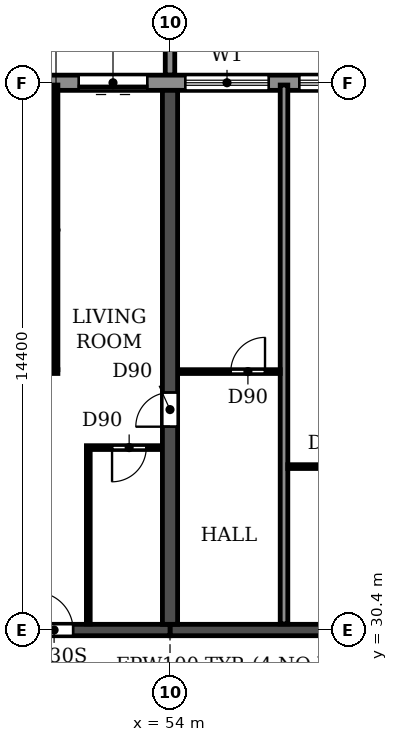
"""IFC4 building model, lengths in metres.
Left out: names, types, materials, properties, quantities, classifications, styles, units other than length and angle.
Written with IfcOpenShell. Run it as: python <this file> out.ifc"""

import sys

from ifc_helpers import new_model, si_unit, direction, frame, frame_2d, origin, place, context, subcontext, project, spatial, polyline, rectangle, outline, extrude, source, transform, mapped, element, fill, save


model = new_model("IFC4")
c1 = context("Model", 3, precision=1e-05, world=origin(), true_north=direction((0.0, 1.0)))
c2 = subcontext(c1, "Body", "Model", "MODEL_VIEW")
j1 = project(units=[si_unit("LENGTHUNIT", "METRE"), si_unit("PLANEANGLEUNIT", "RADIAN")], contexts=[c1])
p1 = place(None, origin())
s1 = spatial("IfcSite", under=j1, at=p1, CompositionType="ELEMENT")
p2 = place(p1, origin())
s2 = spatial("IfcBuilding", under=s1, at=p2, CompositionType="ELEMENT")
p3 = place(p2, frame((0.0, 0.0, 33.3)))
s3 = spatial("IfcBuildingStorey", under=s2, at=p3, CompositionType="ELEMENT", Elevation=33.3)
p4 = place(p3, frame((54.0, 30.55, 0.0), z_axis=(0.0, 0.0, 1.0), x_axis=(0.0, 1.0, 0.0)))
e1 = element("IfcWall", 1, at=p4, inside=s3, PredefinedType="SHEAR", context=c2, shape_type="SweptSolid", body=[
    extrude(rectangle(XDim=14.05, YDim=0.4, at=frame_2d((7.025, 0.0))), origin(), (0.0, 0.0, 1.0), 3.05),
])
p5 = place(p4, frame((5.2, 0.0, 0.0)))
e2 = element("IfcOpeningElement", 2, at=p5, cuts=e1, PredefinedType="OPENING", context=c2, shape_type="SweptSolid", body=[
    extrude(rectangle(XDim=0.9, YDim=2.1, at=frame_2d((0.45, 1.05))), frame((0.0, 0.21, 0.0), z_axis=(0.0, -1.0, 0.0), x_axis=(1.0, 0.0, 0.0)), (0.0, 0.0, 1.0), 0.42),
])
p6 = place(p3, frame((48.0, 30.4, 0.0), z_axis=(0.0, 0.0, 1.0), x_axis=(1.0, 0.0, 0.0)))
e3 = element("IfcWall", 3, at=p6, inside=s3, PredefinedType="SHEAR", context=c2, shape_type="SweptSolid", body=[
    extrude(rectangle(XDim=6.0, YDim=0.3, at=frame_2d((3.0, 0.0))), origin(), (0.0, 0.0, 1.0), 2.45),
])
p7 = place(p6, frame((2.45, 0.0, 0.0)))
e4 = element("IfcOpeningElement", 4, at=p7, cuts=e3, PredefinedType="OPENING", context=c2, shape_type="SweptSolid", body=[
    extrude(rectangle(XDim=1.0, YDim=2.1, at=frame_2d((0.5, 1.05))), frame((0.0, 0.16, 0.0), z_axis=(0.0, -1.0, 0.0), x_axis=(1.0, 0.0, 0.0)), (0.0, 0.0, 1.0), 0.32),
])
p8 = place(p3, frame((54.0, 30.4, 0.0), z_axis=(0.0, 0.0, 1.0), x_axis=(1.0, 0.0, 0.0)))
e5 = element("IfcWall", 5, at=p8, inside=s3, PredefinedType="SHEAR", context=c2, shape_type="SweptSolid", body=[
    extrude(rectangle(XDim=6.0, YDim=0.3, at=frame_2d((3.0, 0.0))), origin(), (0.0, 0.0, 1.0), 2.45),
])
p9 = place(p3, frame((97.317, 44.8, 0.0), z_axis=(0.0, 0.0, 1.0), x_axis=(-1.0, 0.0, 0.0)))
e6 = element("IfcWall", 6, at=p9, inside=s3, PredefinedType="STANDARD", context=c2, shape_type="SweptSolid", body=[
    extrude(rectangle(XDim=92.634, YDim=0.4, at=frame_2d((46.317, 0.0))), origin(), (0.0, 0.0, 1.0), 3.05),
])
p10 = place(p9, frame((88.717, 0.0, 0.9)))
e7 = element("IfcOpeningElement", 7, at=p10, cuts=e6, PredefinedType="OPENING", context=c2, shape_type="SweptSolid", body=[
    extrude(rectangle(XDim=2.2, YDim=1.5, at=frame_2d((1.1, 0.75))), frame((0.0, 0.21, 0.0), z_axis=(0.0, -1.0, 0.0), x_axis=(1.0, 0.0, 0.0)), (0.0, 0.0, 1.0), 0.42),
])
p11 = place(p9, frame((85.917, 0.0, 0.0)))
e8 = element("IfcOpeningElement", 8, at=p11, cuts=e6, PredefinedType="OPENING", context=c2, shape_type="SweptSolid", body=[
    extrude(rectangle(XDim=1.8, YDim=2.4, at=frame_2d((0.9, 1.2))), frame((0.0, 0.21, 0.0), z_axis=(0.0, -1.0, 0.0), x_axis=(1.0, 0.0, 0.0)), (0.0, 0.0, 1.0), 0.42),
])
p12 = place(p9, frame((82.717, 0.0, 0.9)))
e9 = element("IfcOpeningElement", 9, at=p12, cuts=e6, PredefinedType="OPENING", context=c2, shape_type="SweptSolid", body=[
    extrude(rectangle(XDim=2.2, YDim=1.5, at=frame_2d((1.1, 0.75))), frame((0.0, 0.21, 0.0), z_axis=(0.0, -1.0, 0.0), x_axis=(1.0, 0.0, 0.0)), (0.0, 0.0, 1.0), 0.42),
])
p13 = place(p9, frame((79.917, 0.0, 0.0)))
e10 = element("IfcOpeningElement", 10, at=p13, cuts=e6, PredefinedType="OPENING", context=c2, shape_type="SweptSolid", body=[
    extrude(rectangle(XDim=1.8, YDim=2.4, at=frame_2d((0.9, 1.2))), frame((0.0, 0.21, 0.0), z_axis=(0.0, -1.0, 0.0), x_axis=(1.0, 0.0, 0.0)), (0.0, 0.0, 1.0), 0.42),
])
p14 = place(p9, frame((76.717, 0.0, 0.9)))
e11 = element("IfcOpeningElement", 11, at=p14, cuts=e6, PredefinedType="OPENING", context=c2, shape_type="SweptSolid", body=[
    extrude(rectangle(XDim=2.2, YDim=1.5, at=frame_2d((1.1, 0.75))), frame((0.0, 0.21, 0.0), z_axis=(0.0, -1.0, 0.0), x_axis=(1.0, 0.0, 0.0)), (0.0, 0.0, 1.0), 0.42),
])
p15 = place(p9, frame((73.717, 0.0, 0.9)))
e12 = element("IfcOpeningElement", 12, at=p15, cuts=e6, PredefinedType="OPENING", context=c2, shape_type="SweptSolid", body=[
    extrude(rectangle(XDim=2.2, YDim=1.5, at=frame_2d((1.1, 0.75))), frame((0.0, 0.21, 0.0), z_axis=(0.0, -1.0, 0.0), x_axis=(1.0, 0.0, 0.0)), (0.0, 0.0, 1.0), 0.42),
])
p16 = place(p9, frame((70.717, 0.0, 0.9)))
e13 = element("IfcOpeningElement", 13, at=p16, cuts=e6, PredefinedType="OPENING", context=c2, shape_type="SweptSolid", body=[
    extrude(rectangle(XDim=2.2, YDim=1.5, at=frame_2d((1.1, 0.75))), frame((0.0, 0.21, 0.0), z_axis=(0.0, -1.0, 0.0), x_axis=(1.0, 0.0, 0.0)), (0.0, 0.0, 1.0), 0.42),
])
p17 = place(p9, frame((67.917, 0.0, 0.0)))
e14 = element("IfcOpeningElement", 14, at=p17, cuts=e6, PredefinedType="OPENING", context=c2, shape_type="SweptSolid", body=[
    extrude(rectangle(XDim=1.8, YDim=2.4, at=frame_2d((0.9, 1.2))), frame((0.0, 0.21, 0.0), z_axis=(0.0, -1.0, 0.0), x_axis=(1.0, 0.0, 0.0)), (0.0, 0.0, 1.0), 0.42),
])
p18 = place(p9, frame((64.717, 0.0, 0.9)))
e15 = element("IfcOpeningElement", 15, at=p18, cuts=e6, PredefinedType="OPENING", context=c2, shape_type="SweptSolid", body=[
    extrude(rectangle(XDim=2.2, YDim=1.5, at=frame_2d((1.1, 0.75))), frame((0.0, 0.21, 0.0), z_axis=(0.0, -1.0, 0.0), x_axis=(1.0, 0.0, 0.0)), (0.0, 0.0, 1.0), 0.42),
])
p19 = place(p9, frame((61.717, 0.0, 0.9)))
e16 = element("IfcOpeningElement", 16, at=p19, cuts=e6, PredefinedType="OPENING", context=c2, shape_type="SweptSolid", body=[
    extrude(rectangle(XDim=2.2, YDim=1.5, at=frame_2d((1.1, 0.75))), frame((0.0, 0.21, 0.0), z_axis=(0.0, -1.0, 0.0), x_axis=(1.0, 0.0, 0.0)), (0.0, 0.0, 1.0), 0.42),
])
p20 = place(p9, frame((58.717, 0.0, 0.9)))
e17 = element("IfcOpeningElement", 17, at=p20, cuts=e6, PredefinedType="OPENING", context=c2, shape_type="SweptSolid", body=[
    extrude(rectangle(XDim=2.2, YDim=1.5, at=frame_2d((1.1, 0.75))), frame((0.0, 0.21, 0.0), z_axis=(0.0, -1.0, 0.0), x_axis=(1.0, 0.0, 0.0)), (0.0, 0.0, 1.0), 0.42),
])
p21 = place(p9, frame((55.917, 0.0, 0.0)))
e18 = element("IfcOpeningElement", 18, at=p21, cuts=e6, PredefinedType="OPENING", context=c2, shape_type="SweptSolid", body=[
    extrude(rectangle(XDim=1.8, YDim=2.4, at=frame_2d((0.9, 1.2))), frame((0.0, 0.21, 0.0), z_axis=(0.0, -1.0, 0.0), x_axis=(1.0, 0.0, 0.0)), (0.0, 0.0, 1.0), 0.42),
])
p22 = place(p9, frame((52.717, 0.0, 0.9)))
e19 = element("IfcOpeningElement", 19, at=p22, cuts=e6, PredefinedType="OPENING", context=c2, shape_type="SweptSolid", body=[
    extrude(rectangle(XDim=2.2, YDim=1.5, at=frame_2d((1.1, 0.75))), frame((0.0, 0.21, 0.0), z_axis=(0.0, -1.0, 0.0), x_axis=(1.0, 0.0, 0.0)), (0.0, 0.0, 1.0), 0.42),
])
p23 = place(p9, frame((49.717, 0.0, 0.9)))
e20 = element("IfcOpeningElement", 20, at=p23, cuts=e6, PredefinedType="OPENING", context=c2, shape_type="SweptSolid", body=[
    extrude(rectangle(XDim=2.2, YDim=1.5, at=frame_2d((1.1, 0.75))), frame((0.0, 0.21, 0.0), z_axis=(0.0, -1.0, 0.0), x_axis=(1.0, 0.0, 0.0)), (0.0, 0.0, 1.0), 0.42),
])
p24 = place(p9, frame((46.717, 0.0, 0.9)))
e21 = element("IfcOpeningElement", 21, at=p24, cuts=e6, PredefinedType="OPENING", context=c2, shape_type="SweptSolid", body=[
    extrude(rectangle(XDim=2.2, YDim=1.5, at=frame_2d((1.1, 0.75))), frame((0.0, 0.21, 0.0), z_axis=(0.0, -1.0, 0.0), x_axis=(1.0, 0.0, 0.0)), (0.0, 0.0, 1.0), 0.42),
])
p25 = place(p9, frame((43.917, 0.0, 0.0)))
e22 = element("IfcOpeningElement", 22, at=p25, cuts=e6, PredefinedType="OPENING", context=c2, shape_type="SweptSolid", body=[
    extrude(rectangle(XDim=1.8, YDim=2.4, at=frame_2d((0.9, 1.2))), frame((0.0, 0.21, 0.0), z_axis=(0.0, -1.0, 0.0), x_axis=(1.0, 0.0, 0.0)), (0.0, 0.0, 1.0), 0.42),
])
p26 = place(p9, frame((40.717, 0.0, 0.9)))
e23 = element("IfcOpeningElement", 23, at=p26, cuts=e6, PredefinedType="OPENING", context=c2, shape_type="SweptSolid", body=[
    extrude(rectangle(XDim=2.2, YDim=1.5, at=frame_2d((1.1, 0.75))), frame((0.0, 0.21, 0.0), z_axis=(0.0, -1.0, 0.0), x_axis=(1.0, 0.0, 0.0)), (0.0, 0.0, 1.0), 0.42),
])
p27 = place(p9, frame((37.717, 0.0, 0.9)))
e24 = element("IfcOpeningElement", 24, at=p27, cuts=e6, PredefinedType="OPENING", context=c2, shape_type="SweptSolid", body=[
    extrude(rectangle(XDim=2.2, YDim=1.5, at=frame_2d((1.1, 0.75))), frame((0.0, 0.21, 0.0), z_axis=(0.0, -1.0, 0.0), x_axis=(1.0, 0.0, 0.0)), (0.0, 0.0, 1.0), 0.42),
])
p28 = place(p9, frame((34.717, 0.0, 0.9)))
e25 = element("IfcOpeningElement", 25, at=p28, cuts=e6, PredefinedType="OPENING", context=c2, shape_type="SweptSolid", body=[
    extrude(rectangle(XDim=2.2, YDim=1.5, at=frame_2d((1.1, 0.75))), frame((0.0, 0.21, 0.0), z_axis=(0.0, -1.0, 0.0), x_axis=(1.0, 0.0, 0.0)), (0.0, 0.0, 1.0), 0.42),
])
p29 = place(p9, frame((31.917, 0.0, 0.0)))
e26 = element("IfcOpeningElement", 26, at=p29, cuts=e6, PredefinedType="OPENING", context=c2, shape_type="SweptSolid", body=[
    extrude(rectangle(XDim=1.8, YDim=2.4, at=frame_2d((0.9, 1.2))), frame((0.0, 0.21, 0.0), z_axis=(0.0, -1.0, 0.0), x_axis=(1.0, 0.0, 0.0)), (0.0, 0.0, 1.0), 0.42),
])
p30 = place(p9, frame((28.717, 0.0, 0.9)))
e27 = element("IfcOpeningElement", 27, at=p30, cuts=e6, PredefinedType="OPENING", context=c2, shape_type="SweptSolid", body=[
    extrude(rectangle(XDim=2.2, YDim=1.5, at=frame_2d((1.1, 0.75))), frame((0.0, 0.21, 0.0), z_axis=(0.0, -1.0, 0.0), x_axis=(1.0, 0.0, 0.0)), (0.0, 0.0, 1.0), 0.42),
])
p31 = place(p9, frame((25.717, 0.0, 0.9)))
e28 = element("IfcOpeningElement", 28, at=p31, cuts=e6, PredefinedType="OPENING", context=c2, shape_type="SweptSolid", body=[
    extrude(rectangle(XDim=2.2, YDim=1.5, at=frame_2d((1.1, 0.75))), frame((0.0, 0.21, 0.0), z_axis=(0.0, -1.0, 0.0), x_axis=(1.0, 0.0, 0.0)), (0.0, 0.0, 1.0), 0.42),
])
p32 = place(p9, frame((22.917, 0.0, 0.0)))
e29 = element("IfcOpeningElement", 29, at=p32, cuts=e6, PredefinedType="OPENING", context=c2, shape_type="SweptSolid", body=[
    extrude(rectangle(XDim=1.8, YDim=2.4, at=frame_2d((0.9, 1.2))), frame((0.0, 0.21, 0.0), z_axis=(0.0, -1.0, 0.0), x_axis=(1.0, 0.0, 0.0)), (0.0, 0.0, 1.0), 0.42),
])
p33 = place(p9, frame((19.717, 0.0, 0.9)))
e30 = element("IfcOpeningElement", 30, at=p33, cuts=e6, PredefinedType="OPENING", context=c2, shape_type="SweptSolid", body=[
    extrude(rectangle(XDim=2.2, YDim=1.5, at=frame_2d((1.1, 0.75))), frame((0.0, 0.21, 0.0), z_axis=(0.0, -1.0, 0.0), x_axis=(1.0, 0.0, 0.0)), (0.0, 0.0, 1.0), 0.42),
])
p34 = place(p9, frame((16.717, 0.0, 0.9)))
e31 = element("IfcOpeningElement", 31, at=p34, cuts=e6, PredefinedType="OPENING", context=c2, shape_type="SweptSolid", body=[
    extrude(rectangle(XDim=2.2, YDim=1.5, at=frame_2d((1.1, 0.75))), frame((0.0, 0.21, 0.0), z_axis=(0.0, -1.0, 0.0), x_axis=(1.0, 0.0, 0.0)), (0.0, 0.0, 1.0), 0.42),
])
p35 = place(p9, frame((13.917, 0.0, 0.0)))
e32 = element("IfcOpeningElement", 32, at=p35, cuts=e6, PredefinedType="OPENING", context=c2, shape_type="SweptSolid", body=[
    extrude(rectangle(XDim=1.8, YDim=2.4, at=frame_2d((0.9, 1.2))), frame((0.0, 0.21, 0.0), z_axis=(0.0, -1.0, 0.0), x_axis=(1.0, 0.0, 0.0)), (0.0, 0.0, 1.0), 0.42),
])
p36 = place(p9, frame((10.717, 0.0, 0.9)))
e33 = element("IfcOpeningElement", 33, at=p36, cuts=e6, PredefinedType="OPENING", context=c2, shape_type="SweptSolid", body=[
    extrude(rectangle(XDim=2.2, YDim=1.5, at=frame_2d((1.1, 0.75))), frame((0.0, 0.21, 0.0), z_axis=(0.0, -1.0, 0.0), x_axis=(1.0, 0.0, 0.0)), (0.0, 0.0, 1.0), 0.42),
])
p37 = place(p9, frame((7.917, 0.0, 0.0)))
e34 = element("IfcOpeningElement", 34, at=p37, cuts=e6, PredefinedType="OPENING", context=c2, shape_type="SweptSolid", body=[
    extrude(rectangle(XDim=1.8, YDim=2.4, at=frame_2d((0.9, 1.2))), frame((0.0, 0.21, 0.0), z_axis=(0.0, -1.0, 0.0), x_axis=(1.0, 0.0, 0.0)), (0.0, 0.0, 1.0), 0.42),
])
p38 = place(p9, frame((4.717, 0.0, 0.9)))
e35 = element("IfcOpeningElement", 35, at=p38, cuts=e6, PredefinedType="OPENING", context=c2, shape_type="SweptSolid", body=[
    extrude(rectangle(XDim=2.2, YDim=1.5, at=frame_2d((1.1, 0.75))), frame((0.0, 0.21, 0.0), z_axis=(0.0, -1.0, 0.0), x_axis=(1.0, 0.0, 0.0)), (0.0, 0.0, 1.0), 0.42),
])
p39 = place(p9, frame((1.917, 0.0, 0.0)))
e36 = element("IfcOpeningElement", 36, at=p39, cuts=e6, PredefinedType="OPENING", context=c2, shape_type="SweptSolid", body=[
    extrude(rectangle(XDim=1.8, YDim=2.4, at=frame_2d((0.9, 1.2))), frame((0.0, 0.21, 0.0), z_axis=(0.0, -1.0, 0.0), x_axis=(1.0, 0.0, 0.0)), (0.0, 0.0, 1.0), 0.42),
])
m1 = source(origin(), c2, "Body", "SweptSolid", [
    extrude(outline(polyline([(0.0, 0.0), (0.25, 0.0), (0.25, 3.1), (0.0, 3.1), (0.0, 0.0)])), origin(), (0.0, 0.0, 1.0), 3.1),
])
p40 = place(p3, frame((53.875, 45.0, 0.0)))
e37 = element("IfcWall", 37, at=p40, inside=s3, PredefinedType="STANDARD", context=c2, shape_type="MappedRepresentation", body=[
    mapped(m1, transform((0.0, 0.0, 0.0))),
])
p41 = place(p3, frame((57.0, 30.56, 0.0), z_axis=(0.0, 0.0, 1.0), x_axis=(0.0, 1.0, 0.0)))
e38 = element("IfcWall", 38, at=p41, inside=s3, PredefinedType="PARTITIONING", context=c2, shape_type="SweptSolid", body=[
    extrude(rectangle(XDim=14.18, YDim=0.2, at=frame_2d((7.09, 0.0))), origin(), (0.0, 0.0, 1.0), 3.05),
])
p42 = place(p3, frame((57.1, 34.7, 0.0), z_axis=(0.0, 0.0, 1.0), x_axis=(1.0, 0.0, 0.0)))
e39 = element("IfcWall", 39, at=p42, inside=s3, PredefinedType="PARTITIONING", context=c2, shape_type="SweptSolid", body=[
    extrude(rectangle(XDim=2.69, YDim=0.1, at=frame_2d((1.345, 0.0))), origin(), (0.0, 0.0, 1.0), 3.05),
])
p43 = place(p42, frame((1.0, 0.0, 0.0)))
e40 = element("IfcOpeningElement", 40, at=p43, cuts=e39, PredefinedType="OPENING", context=c2, shape_type="SweptSolid", body=[
    extrude(rectangle(XDim=0.8, YDim=2.1, at=frame_2d((0.4, 1.05))), frame((0.0, 0.06, 0.0), z_axis=(0.0, -1.0, 0.0), x_axis=(1.0, 0.0, 0.0)), (0.0, 0.0, 1.0), 0.12),
])
p44 = place(p3, frame((51.8, 35.2, 0.0), z_axis=(0.0, 0.0, 1.0), x_axis=(1.0, 0.0, 0.0)))
e41 = element("IfcWall", 41, at=p44, inside=s3, PredefinedType="PARTITIONING", context=c2, shape_type="SweptSolid", body=[
    extrude(rectangle(XDim=1.99, YDim=0.1, at=frame_2d((0.995, 0.0))), origin(), (0.0, 0.0, 1.0), 3.05),
])
p45 = place(p44, frame((0.675, 0.0, 0.0)))
e42 = element("IfcOpeningElement", 42, at=p45, cuts=e41, PredefinedType="OPENING", context=c2, shape_type="SweptSolid", body=[
    extrude(rectangle(XDim=0.9, YDim=2.1, at=frame_2d((0.45, 1.05))), frame((0.0, 0.06, 0.0), z_axis=(0.0, -1.0, 0.0), x_axis=(1.0, 0.0, 0.0)), (0.0, 0.0, 1.0), 0.12),
])
p46 = place(p3, frame((48.21, 37.2, 0.0), z_axis=(0.0, 0.0, 1.0), x_axis=(1.0, 0.0, 0.0)))
e43 = element("IfcWall", 43, at=p46, inside=s3, PredefinedType="PARTITIONING", context=c2, shape_type="SweptSolid", body=[
    extrude(rectangle(XDim=2.84, YDim=0.1, at=frame_2d((1.42, 0.0))), origin(), (0.0, 0.0, 1.0), 3.05),
])
p47 = place(p46, frame((1.39, 0.0, 0.0)))
e44 = element("IfcOpeningElement", 44, at=p47, cuts=e43, PredefinedType="OPENING", context=c2, shape_type="SweptSolid", body=[
    extrude(rectangle(XDim=0.9, YDim=2.1, at=frame_2d((0.45, 1.05))), frame((0.0, 0.06, 0.0), z_axis=(0.0, -1.0, 0.0), x_axis=(1.0, 0.0, 0.0)), (0.0, 0.0, 1.0), 0.12),
])
p48 = place(p3, frame((54.21, 37.2, 0.0), z_axis=(0.0, 0.0, 1.0), x_axis=(1.0, 0.0, 0.0)))
e45 = element("IfcWall", 45, at=p48, inside=s3, PredefinedType="PARTITIONING", context=c2, shape_type="SweptSolid", body=[
    extrude(rectangle(XDim=2.69, YDim=0.1, at=frame_2d((1.345, 0.0))), origin(), (0.0, 0.0, 1.0), 3.05),
])
p49 = place(p48, frame((1.39, 0.0, 0.0)))
e46 = element("IfcOpeningElement", 46, at=p49, cuts=e45, PredefinedType="OPENING", context=c2, shape_type="SweptSolid", body=[
    extrude(rectangle(XDim=0.9, YDim=2.1, at=frame_2d((0.45, 1.05))), frame((0.0, 0.06, 0.0), z_axis=(0.0, -1.0, 0.0), x_axis=(1.0, 0.0, 0.0)), (0.0, 0.0, 1.0), 0.12),
])
p50 = place(p3, frame((51.0, 37.25, 0.0), z_axis=(0.0, 0.0, 1.0), x_axis=(0.0, 1.0, 0.0)))
e47 = element("IfcWall", 47, at=p50, inside=s3, PredefinedType="PARTITIONING", context=c2, shape_type="SweptSolid", body=[
    extrude(rectangle(XDim=7.49, YDim=0.1, at=frame_2d((3.745, 0.0))), origin(), (0.0, 0.0, 1.0), 3.05),
])
p51 = place(p3, frame((51.85, 30.56, 0.0), z_axis=(0.0, 0.0, 1.0), x_axis=(0.0, 1.0, 0.0)))
e48 = element("IfcWall", 48, at=p51, inside=s3, PredefinedType="PARTITIONING", context=c2, shape_type="SweptSolid", body=[
    extrude(rectangle(XDim=4.59, YDim=0.1, at=frame_2d((2.295, 0.0))), origin(), (0.0, 0.0, 1.0), 3.05),
])
p52 = place(p25, origin())
e49 = element("IfcDoor", 49, at=p52, inside=s3, OperationType="DOUBLE_DOOR_SLIDING", PredefinedType="DOOR", context=c2, shape_type="SweptSolid", body=[
    extrude(rectangle(XDim=1.8, YDim=2.4, at=frame_2d((0.9, 1.2))), frame((0.0, 0.025, 0.0), z_axis=(0.0, -1.0, 0.0), x_axis=(1.0, 0.0, 0.0)), (0.0, 0.0, 1.0), 0.05),
])
fill(e22, e49)
p53 = place(p26, origin())
e50 = element("IfcWindow", 50, at=p53, inside=s3, PartitioningType="DOUBLE_PANEL_HORIZONTAL", PredefinedType="WINDOW", context=c2, shape_type="SweptSolid", body=[
    extrude(rectangle(XDim=2.2, YDim=1.5, at=frame_2d((1.1, 0.75))), frame((0.0, 0.03, 0.0), z_axis=(0.0, -1.0, 0.0), x_axis=(1.0, 0.0, 0.0)), (0.0, 0.0, 1.0), 0.06),
])
fill(e23, e50)
p54 = place(p27, origin())
e51 = element("IfcWindow", 51, at=p54, inside=s3, PartitioningType="DOUBLE_PANEL_HORIZONTAL", PredefinedType="WINDOW", context=c2, shape_type="SweptSolid", body=[
    extrude(rectangle(XDim=2.2, YDim=1.5, at=frame_2d((1.1, 0.75))), frame((0.0, 0.03, 0.0), z_axis=(0.0, -1.0, 0.0), x_axis=(1.0, 0.0, 0.0)), (0.0, 0.0, 1.0), 0.06),
])
fill(e24, e51)
p55 = place(p49, origin())
e52 = element("IfcDoor", 52, at=p55, inside=s3, OperationType="SINGLE_SWING_RIGHT", PredefinedType="DOOR", context=c2, shape_type="SweptSolid", body=[
    extrude(rectangle(XDim=0.9, YDim=2.1, at=frame_2d((0.45, 1.05))), frame((0.0, 0.025, 0.0), z_axis=(0.0, -1.0, 0.0), x_axis=(1.0, 0.0, 0.0)), (0.0, 0.0, 1.0), 0.05),
])
fill(e46, e52)
p56 = place(p7, origin())
e53 = element("IfcDoor", 53, at=p56, inside=s3, OperationType="SINGLE_SWING_LEFT", PredefinedType="DOOR", context=c2, shape_type="SweptSolid", body=[
    extrude(rectangle(XDim=1.0, YDim=2.1, at=frame_2d((0.5, 1.05))), frame((0.0, 0.025, 0.0), z_axis=(0.0, -1.0, 0.0), x_axis=(1.0, 0.0, 0.0)), (0.0, 0.0, 1.0), 0.05),
])
fill(e4, e53)
p57 = place(p45, frame((0.9, 0.0, 0.0), z_axis=(0.0, 0.0, 1.0), x_axis=(-1.0, 0.0, 0.0)))
e54 = element("IfcDoor", 54, at=p57, inside=s3, OperationType="SINGLE_SWING_RIGHT", PredefinedType="DOOR", context=c2, shape_type="SweptSolid", body=[
    extrude(rectangle(XDim=0.9, YDim=2.1, at=frame_2d((0.45, 1.05))), frame((0.0, 0.025, 0.0), z_axis=(0.0, -1.0, 0.0), x_axis=(1.0, 0.0, 0.0)), (0.0, 0.0, 1.0), 0.05),
])
fill(e42, e54)
p58 = place(p5, origin())
e55 = element("IfcDoor", 55, at=p58, inside=s3, OperationType="SINGLE_SWING_LEFT", PredefinedType="DOOR", context=c2, shape_type="SweptSolid", body=[
    extrude(rectangle(XDim=0.9, YDim=2.1, at=frame_2d((0.45, 1.05))), frame((0.0, 0.025, 0.0), z_axis=(0.0, -1.0, 0.0), x_axis=(1.0, 0.0, 0.0)), (0.0, 0.0, 1.0), 0.05),
])
fill(e2, e55)
save(model, sys.argv[1])
